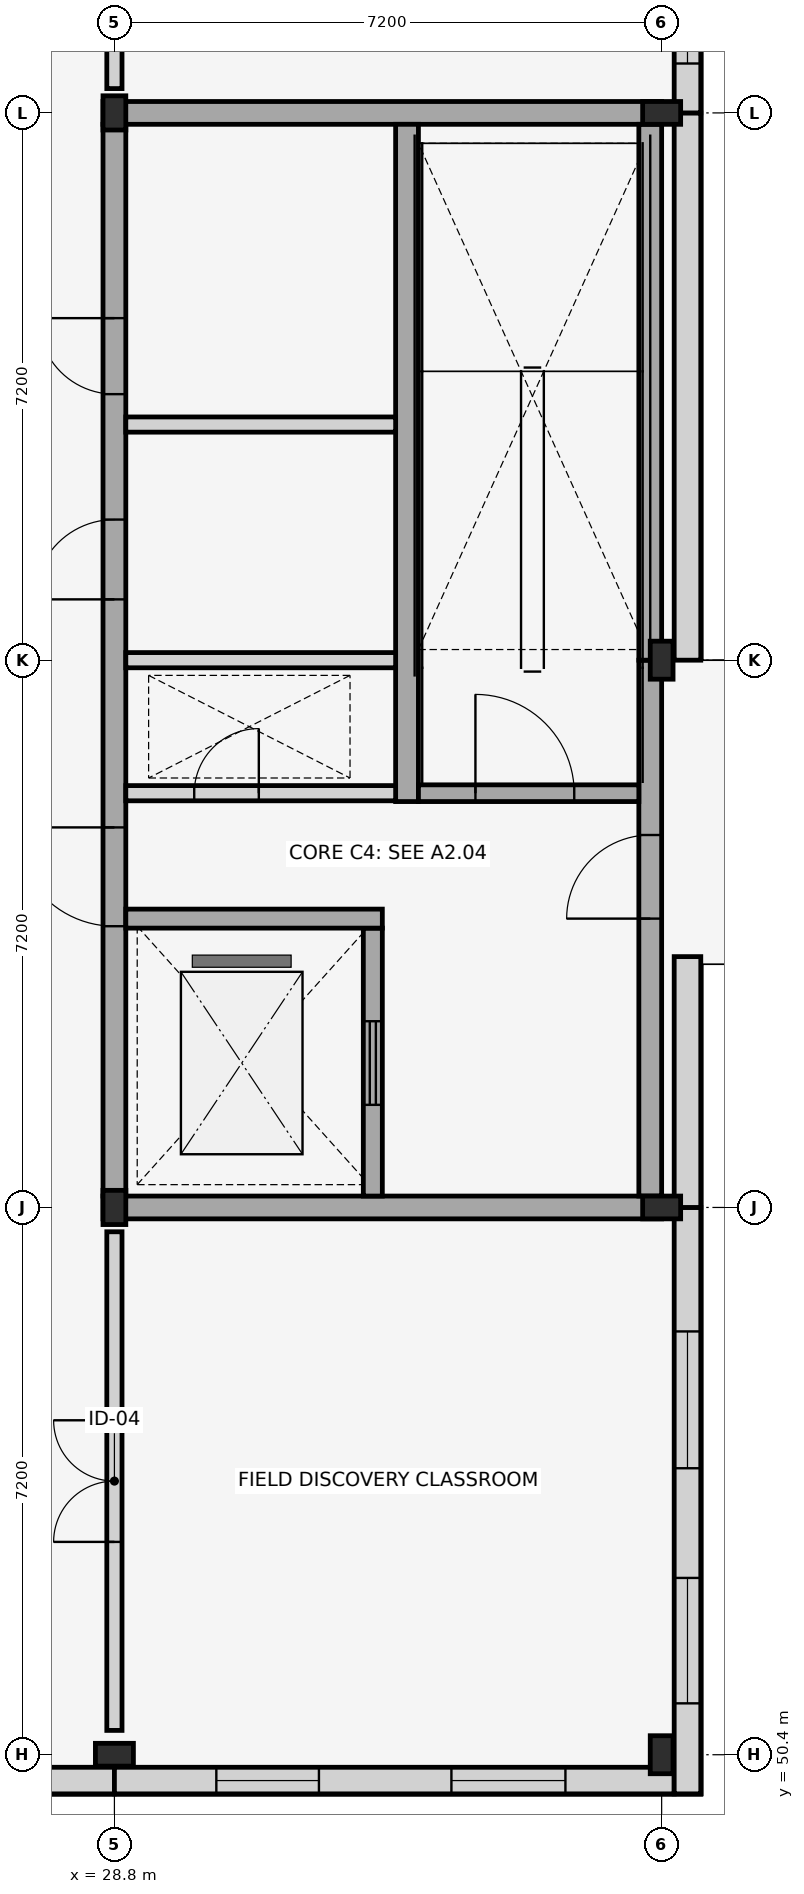
"""IFC4 building model, lengths in metres.
Left out: names, types, materials, properties, quantities, classifications, styles, units other than length and angle.
Written with IfcOpenShell. Run it as: python <this file> out.ifc"""

import sys

from ifc_helpers import new_model, si_unit, direction, frame, frame_2d, origin, origin_2d, place, context, subcontext, project, spatial, rectangle, i_section, extrude, element, fill, save


model = new_model("IFC4")
c1 = context("Model", 3, precision=1e-05, world=origin(), true_north=direction((0.0, 1.0)))
c2 = subcontext(c1, "Body", "Model", "MODEL_VIEW")
j1 = project(units=[si_unit("LENGTHUNIT", "METRE"), si_unit("PLANEANGLEUNIT", "RADIAN")], contexts=[c1])
p1 = place(None, origin())
s1 = spatial("IfcSite", under=j1, at=p1, CompositionType="ELEMENT")
p2 = place(p1, origin())
s2 = spatial("IfcBuilding", under=s1, at=p2, CompositionType="ELEMENT")
p3 = place(p2, origin())
s3 = spatial("IfcBuildingStorey", under=s2, at=p3, CompositionType="ELEMENT", Elevation=0.0)
p4 = place(p3, frame((28.8, 50.4, 0.0), z_axis=(0.0, 0.0, 1.0), x_axis=(0.0, 1.0, 0.0)))
e1 = element("IfcColumn", 1, at=p4, inside=s3, PredefinedType="COLUMN", context=c2, shape_type="SweptSolid", body=[
    extrude(i_section(OverallWidth=0.3, OverallDepth=0.5, WebThickness=0.014, FlangeThickness=0.028, FilletRadius=0.027, at=origin_2d()), origin(), (0.0, 0.0, 1.0), 4.5),
])
for number, where, z_axis, x_axis in (
    (2, (28.8, 57.6, 0.0), (0.0, 0.0, 1.0), (1.0, 0.0, 0.0)),
    (3, (28.8, 72.0, 0.0), (0.0, 0.0, 1.0), (1.0, 0.0, 0.0)),
):
    element("IfcColumn", number, at=place(p3, frame(where, z_axis=z_axis, x_axis=x_axis)), inside=s3, PredefinedType="COLUMN", context=c2, shape_type="SweptSolid", body=[
        extrude(i_section(OverallWidth=0.3, OverallDepth=0.45, WebThickness=0.014, FlangeThickness=0.026, FilletRadius=0.027, at=origin_2d()), origin(), (0.0, 0.0, 1.0), 4.5),
    ])
for number, where, z_axis, x_axis in (
    (4, (36.0, 50.4, 0.0), (0.0, 0.0, 1.0), (1.0, 0.0, 0.0)),
    (5, (36.0, 57.6, 0.0), (0.0, 0.0, 1.0), (0.0, 1.0, 0.0)),
    (6, (36.0, 64.8, 0.0), (0.0, 0.0, 1.0), (1.0, 0.0, 0.0)),
    (7, (36.0, 72.0, 0.0), (0.0, 0.0, 1.0), (0.0, 1.0, 0.0)),
):
    element("IfcColumn", number, at=place(p3, frame(where, z_axis=z_axis, x_axis=x_axis)), inside=s3, PredefinedType="COLUMN", context=c2, shape_type="SweptSolid", body=[
        extrude(i_section(OverallWidth=0.3, OverallDepth=0.5, WebThickness=0.014, FlangeThickness=0.028, FilletRadius=0.027, at=origin_2d()), origin(), (0.0, 0.0, 1.0), 4.5),
    ])
p5 = place(p3, frame((21.6, 50.06, 0.0), z_axis=(0.0, 0.0, 1.0), x_axis=(1.0, 0.0, 0.0)))
e8 = element("IfcWall", 8, at=p5, inside=s3, PredefinedType="STANDARD", context=c2, shape_type="SweptSolid", body=[
    extrude(rectangle(XDim=7.2, YDim=0.35, at=frame_2d((3.6, 0.0))), origin(), (0.0, 0.0, 1.0), 4.5),
])
p6 = place(p5, frame((0.916, 0.0, 0.9)))
e9 = element("IfcOpeningElement", 9, at=p6, cuts=e8, PredefinedType="OPENING", context=c2, shape_type="SweptSolid", body=[
    extrude(rectangle(XDim=2.2, YDim=2.1, at=frame_2d((1.1, 1.05))), frame((0.0, 0.185, 0.0), z_axis=(0.0, -1.0, 0.0), x_axis=(1.0, 0.0, 0.0)), (0.0, 0.0, 1.0), 0.37),
])
p7 = place(p5, frame((4.584, 0.0, 0.9)))
e10 = element("IfcOpeningElement", 10, at=p7, cuts=e8, PredefinedType="OPENING", context=c2, shape_type="SweptSolid", body=[
    extrude(rectangle(XDim=1.2, YDim=2.2, at=frame_2d((0.6, 1.1))), frame((0.0, 0.185, 0.0), z_axis=(0.0, -1.0, 0.0), x_axis=(1.0, 0.0, 0.0)), (0.0, 0.0, 1.0), 0.37),
])
p8 = place(p3, frame((28.8, 50.06, 0.0), z_axis=(0.0, 0.0, 1.0), x_axis=(1.0, 0.0, 0.0)))
e11 = element("IfcWall", 11, at=p8, inside=s3, PredefinedType="STANDARD", context=c2, shape_type="SweptSolid", body=[
    extrude(rectangle(XDim=7.365, YDim=0.35, at=frame_2d((3.683, 0.0))), origin(), (0.0, 0.0, 1.0), 4.5),
])
p9 = place(p8, frame((1.341, 0.0, 0.9)))
e12 = element("IfcOpeningElement", 12, at=p9, cuts=e11, PredefinedType="OPENING", context=c2, shape_type="SweptSolid", body=[
    extrude(rectangle(XDim=1.35, YDim=2.2, at=frame_2d((0.675, 1.1))), frame((0.0, 0.185, 0.0), z_axis=(0.0, -1.0, 0.0), x_axis=(1.0, 0.0, 0.0)), (0.0, 0.0, 1.0), 0.37),
])
p10 = place(p8, frame((4.434, 0.0, 0.9)))
e13 = element("IfcOpeningElement", 13, at=p10, cuts=e11, PredefinedType="OPENING", context=c2, shape_type="SweptSolid", body=[
    extrude(rectangle(XDim=1.5, YDim=2.4, at=frame_2d((0.75, 1.2))), frame((0.0, 0.185, 0.0), z_axis=(0.0, -1.0, 0.0), x_axis=(1.0, 0.0, 0.0)), (0.0, 0.0, 1.0), 0.37),
])
p11 = place(p3, frame((36.34, 49.885, 0.0), z_axis=(0.0, 0.0, 1.0), x_axis=(0.0, 1.0, 0.0)))
e14 = element("IfcWall", 14, at=p11, inside=s3, PredefinedType="STANDARD", context=c2, shape_type="SweptSolid", body=[
    extrude(rectangle(XDim=7.715, YDim=0.35, at=frame_2d((3.857, 0.0))), origin(), (0.0, 0.0, 1.0), 4.5),
])
p12 = place(p11, frame((1.191, 0.0, 0.9)))
e15 = element("IfcOpeningElement", 15, at=p12, cuts=e14, PredefinedType="OPENING", context=c2, shape_type="SweptSolid", body=[
    extrude(rectangle(XDim=1.65, YDim=2.4, at=frame_2d((0.825, 1.2))), frame((0.0, 0.185, 0.0), z_axis=(0.0, -1.0, 0.0), x_axis=(1.0, 0.0, 0.0)), (0.0, 0.0, 1.0), 0.37),
])
p13 = place(p11, frame((4.284, 0.0, 0.9)))
e16 = element("IfcOpeningElement", 16, at=p13, cuts=e14, PredefinedType="OPENING", context=c2, shape_type="SweptSolid", body=[
    extrude(rectangle(XDim=1.8, YDim=2.4, at=frame_2d((0.9, 1.2))), frame((0.0, 0.185, 0.0), z_axis=(0.0, -1.0, 0.0), x_axis=(1.0, 0.0, 0.0)), (0.0, 0.0, 1.0), 0.37),
])
p14 = place(p3, frame((36.34, 57.6, 0.0), z_axis=(0.0, 0.0, 1.0), x_axis=(0.0, 1.0, 0.0)))
e17 = element("IfcWall", 17, at=p14, inside=s3, PredefinedType="STANDARD", context=c2, shape_type="SweptSolid", body=[
    extrude(rectangle(XDim=3.3, YDim=0.35, at=frame_2d((1.65, 0.0))), origin(), (0.0, 0.0, 1.0), 4.5),
])
p15 = place(p3, frame((36.34, 64.8, 0.0), z_axis=(0.0, 0.0, 1.0), x_axis=(0.0, 1.0, 0.0)))
e18 = element("IfcWall", 18, at=p15, inside=s3, PredefinedType="STANDARD", context=c2, shape_type="SweptSolid", body=[
    extrude(rectangle(XDim=7.2, YDim=0.35, at=frame_2d((3.6, 0.0))), origin(), (0.0, 0.0, 1.0), 4.5),
])
p16 = place(p3, frame((36.34, 72.0, 0.0), z_axis=(0.0, 0.0, 1.0), x_axis=(0.0, 1.0, 0.0)))
e19 = element("IfcWall", 19, at=p16, inside=s3, PredefinedType="STANDARD", context=c2, shape_type="SweptSolid", body=[
    extrude(rectangle(XDim=7.2, YDim=0.35, at=frame_2d((3.6, 0.0))), origin(), (0.0, 0.0, 1.0), 4.5),
])
p17 = place(p16, frame((2.65, 0.0, 0.0)))
e20 = element("IfcOpeningElement", 20, at=p17, cuts=e19, PredefinedType="OPENING", context=c2, shape_type="SweptSolid", body=[
    extrude(rectangle(XDim=1.9, YDim=2.45, at=frame_2d((0.95, 1.225))), frame((0.0, 0.185, 0.0), z_axis=(0.0, -1.0, 0.0), x_axis=(1.0, 0.0, 0.0)), (0.0, 0.0, 1.0), 0.37),
])
p18 = place(p16, frame((2.55, 0.0, 2.6)))
e21 = element("IfcOpeningElement", 21, at=p18, cuts=e19, PredefinedType="OPENING", context=c2, shape_type="SweptSolid", body=[
    extrude(rectangle(XDim=2.1, YDim=1.15, at=frame_2d((1.05, 0.575))), frame((0.0, 0.185, 0.0), z_axis=(0.0, -1.0, 0.0), x_axis=(1.0, 0.0, 0.0)), (0.0, 0.0, 1.0), 0.37),
])
p19 = place(p16, frame((0.65, 0.0, 0.35)))
e22 = element("IfcOpeningElement", 22, at=p19, cuts=e19, PredefinedType="OPENING", context=c2, shape_type="SweptSolid", body=[
    extrude(rectangle(XDim=1.1, YDim=2.0, at=frame_2d((0.55, 1.0))), frame((0.0, 0.185, 0.0), z_axis=(0.0, -1.0, 0.0), x_axis=(1.0, 0.0, 0.0)), (0.0, 0.0, 1.0), 0.37),
])
p20 = place(p16, frame((5.45, 0.0, 0.35)))
e23 = element("IfcOpeningElement", 23, at=p20, cuts=e19, PredefinedType="OPENING", context=c2, shape_type="SweptSolid", body=[
    extrude(rectangle(XDim=1.1, YDim=2.0, at=frame_2d((0.55, 1.0))), frame((0.0, 0.185, 0.0), z_axis=(0.0, -1.0, 0.0), x_axis=(1.0, 0.0, 0.0)), (0.0, 0.0, 1.0), 0.37),
])
for number, where, z_axis, x_axis in (
    (24, (28.65, 57.6, 0.0), (0.0, 0.0, 1.0), (1.0, 0.0, 0.0)),
    (25, (28.65, 72.0, 0.0), (0.0, 0.0, 1.0), (1.0, 0.0, 0.0)),
):
    element("IfcWall", number, at=place(p3, frame(where, z_axis=z_axis, x_axis=x_axis)), inside=s3, PredefinedType="SHEAR", context=c2, shape_type="SweptSolid", body=[
        extrude(rectangle(XDim=7.35, YDim=0.3, at=frame_2d((3.675, 0.0))), origin(), (0.0, 0.0, 1.0), 4.28),
    ])
p21 = place(p3, frame((35.85, 57.75, 0.0), z_axis=(0.0, 0.0, 1.0), x_axis=(0.0, 1.0, 0.0)))
e26 = element("IfcWall", 26, at=p21, inside=s3, PredefinedType="SHEAR", context=c2, shape_type="SweptSolid", body=[
    extrude(rectangle(XDim=7.05, YDim=0.3, at=frame_2d((3.525, 0.0))), origin(), (0.0, 0.0, 1.0), 4.28),
])
p22 = place(p21, frame((3.65, 0.0, 0.0)))
e27 = element("IfcOpeningElement", 27, at=p22, cuts=e26, PredefinedType="OPENING", context=c2, shape_type="SweptSolid", body=[
    extrude(rectangle(XDim=1.1, YDim=2.2, at=frame_2d((0.55, 1.1))), frame((0.0, 0.16, 0.0), z_axis=(0.0, -1.0, 0.0), x_axis=(1.0, 0.0, 0.0)), (0.0, 0.0, 1.0), 0.32),
])
p23 = place(p3, frame((35.85, 64.8, 0.0), z_axis=(0.0, 0.0, 1.0), x_axis=(0.0, 1.0, 0.0)))
e28 = element("IfcWall", 28, at=p23, inside=s3, PredefinedType="SHEAR", context=c2, shape_type="SweptSolid", body=[
    extrude(rectangle(XDim=7.05, YDim=0.3, at=frame_2d((3.525, 0.0))), origin(), (0.0, 0.0, 1.0), 4.28),
])
p24 = place(p3, frame((28.8, 57.75, 0.0), z_axis=(0.0, 0.0, 1.0), x_axis=(0.0, 1.0, 0.0)))
e29 = element("IfcWall", 29, at=p24, inside=s3, PredefinedType="SHEAR", context=c2, shape_type="SweptSolid", body=[
    extrude(rectangle(XDim=14.1, YDim=0.3, at=frame_2d((7.05, 0.0))), origin(), (0.0, 0.0, 1.0), 4.28),
])
p25 = place(p24, frame((3.55, 0.0, 0.0)))
e30 = element("IfcOpeningElement", 30, at=p25, cuts=e29, PredefinedType="OPENING", context=c2, shape_type="SweptSolid", body=[
    extrude(rectangle(XDim=1.3, YDim=2.2, at=frame_2d((0.65, 1.1))), frame((0.0, 0.16, 0.0), z_axis=(0.0, -1.0, 0.0), x_axis=(1.0, 0.0, 0.0)), (0.0, 0.0, 1.0), 0.32),
])
p26 = place(p24, frame((7.85, 0.0, 0.0)))
e31 = element("IfcOpeningElement", 31, at=p26, cuts=e29, PredefinedType="OPENING", context=c2, shape_type="SweptSolid", body=[
    extrude(rectangle(XDim=1.05, YDim=2.15, at=frame_2d((0.525, 1.075))), frame((0.0, 0.16, 0.0), z_axis=(0.0, -1.0, 0.0), x_axis=(1.0, 0.0, 0.0)), (0.0, 0.0, 1.0), 0.32),
])
p27 = place(p24, frame((10.55, 0.0, 0.0)))
e32 = element("IfcOpeningElement", 32, at=p27, cuts=e29, PredefinedType="OPENING", context=c2, shape_type="SweptSolid", body=[
    extrude(rectangle(XDim=1.0, YDim=2.15, at=frame_2d((0.5, 1.075))), frame((0.0, 0.16, 0.0), z_axis=(0.0, -1.0, 0.0), x_axis=(1.0, 0.0, 0.0)), (0.0, 0.0, 1.0), 0.32),
])
p28 = place(p3, frame((32.2, 57.75, 0.0), z_axis=(0.0, 0.0, 1.0), x_axis=(0.0, 1.0, 0.0)))
e33 = element("IfcWall", 33, at=p28, inside=s3, PredefinedType="SHEAR", context=c2, shape_type="SweptSolid", body=[
    extrude(rectangle(XDim=3.525, YDim=0.25, at=frame_2d((1.762, 0.0))), origin(), (0.0, 0.0, 1.0), 4.28),
])
p29 = place(p28, frame((1.2, 0.0, 0.0)))
e34 = element("IfcOpeningElement", 34, at=p29, cuts=e33, PredefinedType="OPENING", context=c2, shape_type="SweptSolid", body=[
    extrude(rectangle(XDim=1.1, YDim=2.15, at=frame_2d((0.55, 1.075))), frame((0.0, 0.135, 0.0), z_axis=(0.0, -1.0, 0.0), x_axis=(1.0, 0.0, 0.0)), (0.0, 0.0, 1.0), 0.27),
])
p30 = place(p3, frame((32.65, 62.94, 0.0), z_axis=(0.0, 0.0, 1.0), x_axis=(0.0, 1.0, 0.0)))
e35 = element("IfcWall", 35, at=p30, inside=s3, PredefinedType="SHEAR", context=c2, shape_type="SweptSolid", body=[
    extrude(rectangle(XDim=8.91, YDim=0.3, at=frame_2d((4.455, 0.0))), origin(), (0.0, 0.0, 1.0), 4.28),
])
p31 = place(p3, frame((28.95, 63.05, 0.0), z_axis=(0.0, 0.0, 1.0), x_axis=(1.0, 0.0, 0.0)))
e36 = element("IfcWall", 36, at=p31, inside=s3, PredefinedType="PLUMBINGWALL", context=c2, shape_type="SweptSolid", body=[
    extrude(rectangle(XDim=3.55, YDim=0.2, at=frame_2d((1.775, 0.0))), origin(), (0.0, 0.0, 1.0), 3.7),
])
p32 = place(p31, frame((0.9, 0.0, 0.0)))
e37 = element("IfcOpeningElement", 37, at=p32, cuts=e36, PredefinedType="OPENING", context=c2, shape_type="SweptSolid", body=[
    extrude(rectangle(XDim=0.85, YDim=2.05, at=frame_2d((0.425, 1.025))), frame((0.0, 0.11, 0.0), z_axis=(0.0, -1.0, 0.0), x_axis=(1.0, 0.0, 0.0)), (0.0, 0.0, 1.0), 0.22),
])
p33 = place(p3, frame((32.8, 63.05, 0.0), z_axis=(0.0, 0.0, 1.0), x_axis=(1.0, 0.0, 0.0)))
e38 = element("IfcWall", 38, at=p33, inside=s3, PredefinedType="SHEAR", context=c2, shape_type="SweptSolid", body=[
    extrude(rectangle(XDim=2.9, YDim=0.22, at=frame_2d((1.45, 0.0))), origin(), (0.0, 0.0, 1.0), 4.28),
])
p34 = place(p33, frame((0.75, 0.0, 0.0)))
e39 = element("IfcOpeningElement", 39, at=p34, cuts=e38, PredefinedType="OPENING", context=c2, shape_type="SweptSolid", body=[
    extrude(rectangle(XDim=1.3, YDim=2.2, at=frame_2d((0.65, 1.1))), frame((0.0, 0.12, 0.0), z_axis=(0.0, -1.0, 0.0), x_axis=(1.0, 0.0, 0.0)), (0.0, 0.0, 1.0), 0.24),
])
p35 = place(p3, frame((28.95, 61.4, 0.0), z_axis=(0.0, 0.0, 1.0), x_axis=(1.0, 0.0, 0.0)))
e40 = element("IfcWall", 40, at=p35, inside=s3, PredefinedType="SHEAR", context=c2, shape_type="SweptSolid", body=[
    extrude(rectangle(XDim=3.375, YDim=0.25, at=frame_2d((1.688, 0.0))), origin(), (0.0, 0.0, 1.0), 4.28),
])
for number, where, z_axis, x_axis in (
    (41, (28.95, 64.8, 0.0), (0.0, 0.0, 1.0), (1.0, 0.0, 0.0)),
    (42, (28.95, 67.9, 0.0), (0.0, 0.0, 1.0), (1.0, 0.0, 0.0)),
):
    element("IfcWall", number, at=place(p3, frame(where, z_axis=z_axis, x_axis=x_axis)), inside=s3, PredefinedType="PLUMBINGWALL", context=c2, shape_type="SweptSolid", body=[
        extrude(rectangle(XDim=3.55, YDim=0.2, at=frame_2d((1.775, 0.0))), origin(), (0.0, 0.0, 1.0), 3.7),
    ])
p36 = place(p3, frame((28.8, 72.32, 0.0), z_axis=(0.0, 0.0, 1.0), x_axis=(0.0, 1.0, 0.0)))
e43 = element("IfcWall", 43, at=p36, inside=s3, PredefinedType="PARTITIONING", context=c2, shape_type="SweptSolid", body=[
    extrude(rectangle(XDim=20.96, YDim=0.2, at=frame_2d((10.48, 0.0))), origin(), (0.0, 0.0, 1.0), 3.45),
])
p37 = place(p36, frame((9.73, 0.0, 0.0)))
e44 = element("IfcOpeningElement", 44, at=p37, cuts=e43, PredefinedType="OPENING", context=c2, shape_type="SweptSolid", body=[
    extrude(rectangle(XDim=1.5, YDim=2.25, at=frame_2d((0.75, 1.125))), frame((0.0, 0.11, 0.0), z_axis=(0.0, -1.0, 0.0), x_axis=(1.0, 0.0, 0.0)), (0.0, 0.0, 1.0), 0.22),
])
p38 = place(p3, frame((28.8, 50.72, 0.0), z_axis=(0.0, 0.0, 1.0), x_axis=(0.0, 1.0, 0.0)))
e45 = element("IfcWall", 45, at=p38, inside=s3, PredefinedType="PARTITIONING", context=c2, shape_type="SweptSolid", body=[
    extrude(rectangle(XDim=6.56, YDim=0.2, at=frame_2d((3.28, 0.0))), origin(), (0.0, 0.0, 1.0), 3.45),
])
p39 = place(p38, frame((2.48, 0.0, 0.0)))
e46 = element("IfcOpeningElement", 46, at=p39, cuts=e45, PredefinedType="OPENING", context=c2, shape_type="SweptSolid", body=[
    extrude(rectangle(XDim=1.6, YDim=2.35, at=frame_2d((0.8, 1.175))), frame((0.0, 0.11, 0.0), z_axis=(0.0, -1.0, 0.0), x_axis=(1.0, 0.0, 0.0)), (0.0, 0.0, 1.0), 0.22),
])
p40 = place(p9, origin())
e47 = element("IfcWindow", 47, at=p40, inside=s3, PartitioningType="SINGLE_PANEL", PredefinedType="WINDOW", context=c2, shape_type="SweptSolid", body=[
    extrude(rectangle(XDim=1.35, YDim=2.2, at=frame_2d((0.675, 1.1))), frame((0.0, 0.03, 0.0), z_axis=(0.0, -1.0, 0.0), x_axis=(1.0, 0.0, 0.0)), (0.0, 0.0, 1.0), 0.06),
])
fill(e12, e47)
p41 = place(p10, origin())
e48 = element("IfcWindow", 48, at=p41, inside=s3, PartitioningType="SINGLE_PANEL", PredefinedType="WINDOW", context=c2, shape_type="SweptSolid", body=[
    extrude(rectangle(XDim=1.5, YDim=2.4, at=frame_2d((0.75, 1.2))), frame((0.0, 0.03, 0.0), z_axis=(0.0, -1.0, 0.0), x_axis=(1.0, 0.0, 0.0)), (0.0, 0.0, 1.0), 0.06),
])
fill(e13, e48)
p42 = place(p12, origin())
e49 = element("IfcWindow", 49, at=p42, inside=s3, PartitioningType="SINGLE_PANEL", PredefinedType="WINDOW", context=c2, shape_type="SweptSolid", body=[
    extrude(rectangle(XDim=1.65, YDim=2.4, at=frame_2d((0.825, 1.2))), frame((0.0, 0.03, 0.0), z_axis=(0.0, -1.0, 0.0), x_axis=(1.0, 0.0, 0.0)), (0.0, 0.0, 1.0), 0.06),
])
fill(e15, e49)
p43 = place(p13, origin())
e50 = element("IfcWindow", 50, at=p43, inside=s3, PartitioningType="SINGLE_PANEL", PredefinedType="WINDOW", context=c2, shape_type="SweptSolid", body=[
    extrude(rectangle(XDim=1.8, YDim=2.4, at=frame_2d((0.9, 1.2))), frame((0.0, 0.03, 0.0), z_axis=(0.0, -1.0, 0.0), x_axis=(1.0, 0.0, 0.0)), (0.0, 0.0, 1.0), 0.06),
])
fill(e16, e50)
p44 = place(p19, origin())
e51 = element("IfcWindow", 51, at=p44, inside=s3, PartitioningType="SINGLE_PANEL", PredefinedType="WINDOW", context=c2, shape_type="SweptSolid", body=[
    extrude(rectangle(XDim=1.1, YDim=2.0, at=frame_2d((0.55, 1.0))), frame((0.0, 0.03, 0.0), z_axis=(0.0, -1.0, 0.0), x_axis=(1.0, 0.0, 0.0)), (0.0, 0.0, 1.0), 0.06),
])
fill(e22, e51)
p45 = place(p22, origin())
e52 = element("IfcDoor", 52, at=p45, inside=s3, OperationType="SINGLE_SWING_LEFT", PredefinedType="DOOR", context=c2, shape_type="SweptSolid", body=[
    extrude(rectangle(XDim=1.1, YDim=2.2, at=frame_2d((0.55, 1.1))), frame((0.0, 0.025, 0.0), z_axis=(0.0, -1.0, 0.0), x_axis=(1.0, 0.0, 0.0)), (0.0, 0.0, 1.0), 0.05),
])
fill(e27, e52)
p46 = place(p25, origin())
e53 = element("IfcDoor", 53, at=p46, inside=s3, OperationType="SINGLE_SWING_RIGHT", PredefinedType="DOOR", context=c2, shape_type="SweptSolid", body=[
    extrude(rectangle(XDim=1.3, YDim=2.2, at=frame_2d((0.65, 1.1))), frame((0.0, 0.025, 0.0), z_axis=(0.0, -1.0, 0.0), x_axis=(1.0, 0.0, 0.0)), (0.0, 0.0, 1.0), 0.05),
])
fill(e30, e53)
p47 = place(p26, origin())
e54 = element("IfcDoor", 54, at=p47, inside=s3, OperationType="SINGLE_SWING_LEFT", PredefinedType="DOOR", context=c2, shape_type="SweptSolid", body=[
    extrude(rectangle(XDim=1.05, YDim=2.15, at=frame_2d((0.525, 1.075))), frame((0.0, 0.025, 0.0), z_axis=(0.0, -1.0, 0.0), x_axis=(1.0, 0.0, 0.0)), (0.0, 0.0, 1.0), 0.05),
])
fill(e31, e54)
p48 = place(p27, origin())
e55 = element("IfcDoor", 55, at=p48, inside=s3, OperationType="SINGLE_SWING_RIGHT", PredefinedType="DOOR", context=c2, shape_type="SweptSolid", body=[
    extrude(rectangle(XDim=1.0, YDim=2.15, at=frame_2d((0.5, 1.075))), frame((0.0, 0.025, 0.0), z_axis=(0.0, -1.0, 0.0), x_axis=(1.0, 0.0, 0.0)), (0.0, 0.0, 1.0), 0.05),
])
fill(e32, e55)
p49 = place(p29, origin())
e56 = element("IfcDoor", 56, at=p49, inside=s3, OperationType="SLIDING_TO_LEFT", PredefinedType="DOOR", context=c2, shape_type="SweptSolid", body=[
    extrude(rectangle(XDim=1.1, YDim=2.15, at=frame_2d((0.55, 1.075))), frame((0.0, 0.025, 0.0), z_axis=(0.0, -1.0, 0.0), x_axis=(1.0, 0.0, 0.0)), (0.0, 0.0, 1.0), 0.05),
])
fill(e34, e56)
p50 = place(p32, origin())
e57 = element("IfcDoor", 57, at=p50, inside=s3, OperationType="SINGLE_SWING_RIGHT", PredefinedType="TRAPDOOR", context=c2, shape_type="SweptSolid", body=[
    extrude(rectangle(XDim=0.85, YDim=2.05, at=frame_2d((0.425, 1.025))), frame((0.0, 0.025, 0.0), z_axis=(0.0, -1.0, 0.0), x_axis=(1.0, 0.0, 0.0)), (0.0, 0.0, 1.0), 0.05),
])
fill(e37, e57)
p51 = place(p34, origin())
e58 = element("IfcDoor", 58, at=p51, inside=s3, OperationType="SINGLE_SWING_LEFT", PredefinedType="DOOR", context=c2, shape_type="SweptSolid", body=[
    extrude(rectangle(XDim=1.3, YDim=2.2, at=frame_2d((0.65, 1.1))), frame((0.0, 0.025, 0.0), z_axis=(0.0, -1.0, 0.0), x_axis=(1.0, 0.0, 0.0)), (0.0, 0.0, 1.0), 0.05),
])
fill(e39, e58)
p52 = place(p39, origin())
e59 = element("IfcDoor", 59, at=p52, inside=s3, OperationType="DOUBLE_DOOR_SINGLE_SWING", PredefinedType="DOOR", context=c2, shape_type="SweptSolid", body=[
    extrude(rectangle(XDim=1.6, YDim=2.35, at=frame_2d((0.8, 1.175))), frame((0.0, 0.025, 0.0), z_axis=(0.0, -1.0, 0.0), x_axis=(1.0, 0.0, 0.0)), (0.0, 0.0, 1.0), 0.05),
])
fill(e46, e59)
save(model, sys.argv[1])
